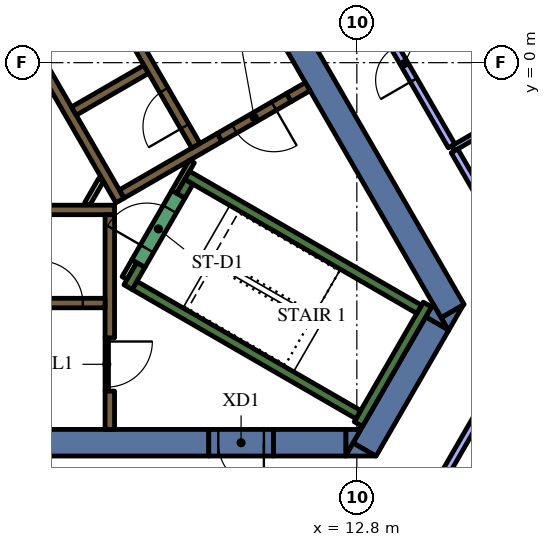
"""IFC4 building model, lengths in metres.
Left out: names, types, materials, properties, quantities, classifications, styles, units other than length and angle.
Written with IfcOpenShell. Run it as: python <this file> out.ifc"""

import sys

from ifc_helpers import new_model, si_unit, direction, frame, frame_2d, origin, place, context, subcontext, project, spatial, polyline, rectangle, outline, extrude, element, fill, save


model = new_model("IFC4")
c1 = context("Model", 3, precision=1e-05, world=origin(), true_north=direction((0.0, 1.0)))
c2 = subcontext(c1, "Body", "Model", "MODEL_VIEW")
j1 = project(units=[si_unit("LENGTHUNIT", "METRE"), si_unit("PLANEANGLEUNIT", "RADIAN")], contexts=[c1])
p1 = place(None, origin())
s1 = spatial("IfcSite", under=j1, at=p1, CompositionType="ELEMENT")
p2 = place(p1, origin())
s2 = spatial("IfcBuilding", under=s1, at=p2, CompositionType="ELEMENT")
p3 = place(p2, frame((0.0, 0.0, 235.2)))
s3 = spatial("IfcBuildingStorey", under=s2, at=p3, CompositionType="ELEMENT", Elevation=235.2)
p4 = place(p3, frame((9.085, 4.264, 0.0), z_axis=(0.0, 0.0, 1.0), x_axis=(0.499998082512, -0.866026510844, 0.0)))
e1 = element("IfcWall", 1, at=p4, inside=s3, PredefinedType="SOLIDWALL", context=c2, shape_type="SweptSolid", body=[
    extrude(rectangle(XDim=12.472, YDim=0.7, at=frame_2d((6.236, 0.0))), origin(), (0.0, 0.0, 1.0), 4.2),
])
p5 = place(p3, origin())
e2 = element("IfcWall", 2, at=p5, inside=s3, PredefinedType="SOLIDWALL", context=c2, shape_type="SweptSolid", body=[
    extrude(outline(polyline([(15.213, -7.05), (15.019, -6.714), (15.601, -6.378), (15.213, -7.05)])), origin(), (0.0, 0.0, 1.0), 4.2),
])
p6 = place(p3, frame((13.003, -10.179, 0.0), z_axis=(0.0, 0.0, 1.0), x_axis=(0.499972675833, 0.866041178825, 0.0)))
e3 = element("IfcWall", 3, at=p6, inside=s3, PredefinedType="SOLIDWALL", context=c2, shape_type="SweptSolid", body=[
    extrude(rectangle(XDim=3.829, YDim=0.7, at=frame_2d((1.915, 0.0))), origin(), (0.0, 0.0, 1.0), 4.2),
])
e4 = element("IfcWall", 4, at=p5, inside=s3, PredefinedType="SOLIDWALL", context=c2, shape_type="SweptSolid", body=[
    extrude(outline(polyline([(12.5, -10.35), (12.698, -10.005), (13.296, -10.35), (12.5, -10.35)])), origin(), (0.0, 0.0, 1.0), 4.2),
])
e5 = element("IfcWall", 5, at=p5, inside=s3, PredefinedType="SOLIDWALL", context=c2, shape_type="SweptSolid", body=[
    extrude(outline(polyline([(14.809, -6.35), (15.197, -7.022), (14.615, -6.686), (14.809, -6.35)])), origin(), (0.0, 0.0, 1.0), 4.2),
])
p7 = place(p3, frame((10.604, -10.0, 0.0), z_axis=(0.0, 0.0, 1.0), x_axis=(1.0, 0.0, 0.0)))
e6 = element("IfcWall", 6, at=p7, inside=s3, PredefinedType="SOLIDWALL", context=c2, shape_type="SweptSolid", body=[
    extrude(rectangle(XDim=1.909, YDim=0.7, at=frame_2d((0.955, 0.0))), origin(), (0.0, 0.0, 1.0), 4.2),
])
e7 = element("IfcWall", 7, at=p5, inside=s3, PredefinedType="SOLIDWALL", context=c2, shape_type="SweptSolid", body=[
    extrude(outline(polyline([(12.904, -9.65), (12.516, -10.322), (12.516, -9.65), (12.904, -9.65)])), origin(), (0.0, 0.0, 1.0), 4.2),
])
p8 = place(p3, frame((8.904, -10.0, 0.0), z_axis=(0.0, 0.0, 1.0), x_axis=(-1.0, 0.0, 0.0)))
e8 = element("IfcWall", 8, at=p8, inside=s3, PredefinedType="SOLIDWALL", context=c2, shape_type="SweptSolid", body=[
    extrude(rectangle(XDim=22.226, YDim=0.7, at=frame_2d((11.113, 0.0))), origin(), (0.0, 0.0, 1.0), 4.2),
])
p9 = place(p3, frame((12.84, -9.511, 0.0), z_axis=(0.0, 0.0, 1.0), x_axis=(0.500048121057, 0.865997619297, 0.0)))
e9 = element("IfcWall", 9, at=p9, inside=s3, PredefinedType="SOLIDWALL", context=c2, shape_type="SweptSolid", body=[
    extrude(rectangle(XDim=3.634, YDim=0.25, at=frame_2d((1.817, 0.0))), origin(), (0.0, 0.0, 1.0), 4.2),
])
p10 = place(p3, frame((12.84, -9.261, 0.0), z_axis=(0.0, 0.0, 1.0), x_axis=(-0.866013990052, 0.500019768644, 0.0)))
e10 = element("IfcWall", 10, at=p10, inside=s3, PredefinedType="SOLIDWALL", context=c2, shape_type="SweptSolid", body=[
    extrude(rectangle(XDim=6.8, YDim=0.25, at=frame_2d((3.4, 0.0))), origin(), (0.0, 0.0, 1.0), 4.2),
])
p11 = place(p3, frame((6.78, -5.906, 0.0), z_axis=(0.0, 0.0, 1.0), x_axis=(0.500223362819, 0.865896406789, 0.0)))
e11 = element("IfcWall", 11, at=p11, inside=s3, PredefinedType="SOLIDWALL", context=c2, shape_type="SweptSolid", body=[
    extrude(rectangle(XDim=0.675, YDim=0.25, at=frame_2d((0.337, 0.0))), origin(), (0.0, 0.0, 1.0), 4.2),
])
p12 = place(p3, frame((8.334, -2.964, 0.0), z_axis=(0.0, 0.0, 1.0), x_axis=(0.866016039709, -0.500016218704, 0.0)))
e12 = element("IfcWall", 12, at=p12, inside=s3, PredefinedType="SOLIDWALL", context=c2, shape_type="SweptSolid", body=[
    extrude(rectangle(XDim=7.05, YDim=0.25, at=frame_2d((3.525, 0.0))), origin(), (0.0, 0.0, 1.0), 4.2),
])
p13 = place(p3, frame((8.168, -3.503, 0.0), z_axis=(0.0, 0.0, 1.0), x_axis=(0.49972245349, 0.866185586049, 0.0)))
e13 = element("IfcWall", 13, at=p13, inside=s3, PredefinedType="SOLIDWALL", context=c2, shape_type="SweptSolid", body=[
    extrude(rectangle(XDim=0.425, YDim=0.25, at=frame_2d((0.212, 0.0))), origin(), (0.0, 0.0, 1.0), 4.2),
])
p14 = place(p3, frame((-5.545, -3.875, 0.0), z_axis=(0.0, 0.0, 1.0), x_axis=(1.0, 0.0, 0.0)))
e14 = element("IfcWall", 14, at=p14, inside=s3, PredefinedType="SOLIDWALL", context=c2, shape_type="SweptSolid", body=[
    extrude(rectangle(XDim=11.97, YDim=0.25, at=frame_2d((5.985, 0.0))), origin(), (0.0, 0.0, 1.0), 4.2),
])
p15 = place(p3, frame((6.3, -7.24, 0.0), z_axis=(0.0, 0.0, 1.0), x_axis=(0.0, 1.0, 0.0)))
e15 = element("IfcWall", 15, at=p15, inside=s3, PredefinedType="SOLIDWALL", context=c2, shape_type="SweptSolid", body=[
    extrude(rectangle(XDim=3.24, YDim=0.25, at=frame_2d((1.62, 0.0))), origin(), (0.0, 0.0, 1.0), 4.2),
])
p16 = place(p3, frame((6.3, -9.65, 0.0), z_axis=(0.0, 0.0, 1.0), x_axis=(0.0, 1.0, 0.0)))
e16 = element("IfcWall", 16, at=p16, inside=s3, PredefinedType="SOLIDWALL", context=c2, shape_type="SweptSolid", body=[
    extrude(rectangle(XDim=1.008, YDim=0.25, at=frame_2d((0.504, 0.0))), origin(), (0.0, 0.0, 1.0), 4.2),
])
p17 = place(p3, frame((11.507, -0.631, 0.0), z_axis=(0.0, 0.0, 1.0), x_axis=(-0.866093731455, -0.499881634324, 0.0)))
e17 = element("IfcWall", 17, at=p17, inside=s3, PredefinedType="SOLIDWALL", context=c2, shape_type="SweptSolid", body=[
    extrude(rectangle(XDim=0.575, YDim=0.25, at=frame_2d((0.288, 0.0))), origin(), (0.0, 0.0, 1.0), 4.2),
])
p18 = place(p3, frame((6.568, -3.627, 0.0), z_axis=(0.0, 0.0, 1.0), x_axis=(-0.499999455981, 0.866025717874, 0.0)))
e18 = element("IfcWall", 18, at=p18, inside=s3, PredefinedType="SOLIDWALL", context=c2, shape_type="SweptSolid", body=[
    extrude(rectangle(XDim=11.978, YDim=0.25, at=frame_2d((5.989, 0.0))), origin(), (0.0, 0.0, 1.0), 4.2),
])
p19 = place(p3, frame((5.354, -1.274, 0.0), z_axis=(0.0, 0.0, 1.0), x_axis=(0.866008176907, 0.50002983664, 0.0)))
e19 = element("IfcWall", 19, at=p19, inside=s3, PredefinedType="SOLIDWALL", context=c2, shape_type="SweptSolid", body=[
    extrude(rectangle(XDim=2.2, YDim=0.25, at=frame_2d((1.1, 0.0))), origin(), (0.0, 0.0, 1.0), 4.2),
])
p20 = place(p3, frame((6.614, -3.456, 0.0), z_axis=(0.0, 0.0, 1.0), x_axis=(0.866032512851, 0.499987686533, 0.0)))
e20 = element("IfcWall", 20, at=p20, inside=s3, PredefinedType="SOLIDWALL", context=c2, shape_type="SweptSolid", body=[
    extrude(rectangle(XDim=2.975, YDim=0.25, at=frame_2d((1.487, 0.0))), origin(), (0.0, 0.0, 1.0), 4.2),
])
p21 = place(p3, frame((6.945, -5.222, 0.0), z_axis=(0.0, 0.0, 1.0), x_axis=(-0.499818422106, -0.866130212453, 0.0)))
e21 = element("IfcWall", 21, at=p21, inside=s3, PredefinedType="PARTITIONING", context=c2, shape_type="SweptSolid", body=[
    extrude(rectangle(XDim=0.514, YDim=0.15, at=frame_2d((0.257, 0.0))), origin(), (0.0, 0.0, 1.0), 3.45),
])
p22 = place(p3, frame((8.459, -2.599, 0.0), z_axis=(0.0, 0.0, 1.0), x_axis=(-0.500041054325, -0.866001699761, 0.0)))
e22 = element("IfcWall", 22, at=p22, inside=s3, PredefinedType="PARTITIONING", context=c2, shape_type="SweptSolid", body=[
    extrude(rectangle(XDim=0.929, YDim=0.15, at=frame_2d((0.464, 0.0))), origin(), (0.0, 0.0, 1.0), 4.2),
])
p23 = place(p3, frame((5.705, -3.718, 0.0), z_axis=(0.0, 0.0, 1.0), x_axis=(0.499962090823, 0.866047289552, 0.0)))
e23 = element("IfcWall", 23, at=p23, inside=s3, PredefinedType="PARTITIONING", context=c2, shape_type="SweptSolid", body=[
    extrude(rectangle(XDim=0.735, YDim=0.15, at=frame_2d((0.367, 0.0))), origin(), (0.0, 0.0, 1.0), 3.45),
])
p24 = place(p3, frame((-6.175, -6.325, 0.0), z_axis=(0.0, 0.0, 1.0), x_axis=(1.0, 0.0, 0.0)))
e24 = element("IfcWall", 24, at=p24, inside=s3, PredefinedType="SOLIDWALL", context=c2, shape_type="SweptSolid", body=[
    extrude(rectangle(XDim=12.35, YDim=0.25, at=frame_2d((6.175, 0.0))), origin(), (0.0, 0.0, 1.0), 4.2),
])
p25 = place(p24, frame((0.585, 0.0, 0.0)))
e25 = element("IfcOpeningElement", 25, at=p25, cuts=e24, PredefinedType="OPENING", context=c2, shape_type="SweptSolid", body=[
    extrude(rectangle(XDim=1.1, YDim=2.1, at=frame_2d((0.55, 1.05))), frame((0.0, 0.135, 0.0), z_axis=(0.0, -1.0, 0.0), x_axis=(1.0, 0.0, 0.0)), (0.0, 0.0, 1.0), 0.27),
])
p26 = place(p24, frame((3.105, 0.0, 0.0)))
e26 = element("IfcOpeningElement", 26, at=p26, cuts=e24, PredefinedType="OPENING", context=c2, shape_type="SweptSolid", body=[
    extrude(rectangle(XDim=1.1, YDim=2.1, at=frame_2d((0.55, 1.05))), frame((0.0, 0.135, 0.0), z_axis=(0.0, -1.0, 0.0), x_axis=(1.0, 0.0, 0.0)), (0.0, 0.0, 1.0), 0.27),
])
p27 = place(p24, frame((5.625, 0.0, 0.0)))
e27 = element("IfcOpeningElement", 27, at=p27, cuts=e24, PredefinedType="OPENING", context=c2, shape_type="SweptSolid", body=[
    extrude(rectangle(XDim=1.1, YDim=2.1, at=frame_2d((0.55, 1.05))), frame((0.0, 0.135, 0.0), z_axis=(0.0, -1.0, 0.0), x_axis=(1.0, 0.0, 0.0)), (0.0, 0.0, 1.0), 0.27),
])
p28 = place(p24, frame((8.145, 0.0, 0.0)))
e28 = element("IfcOpeningElement", 28, at=p28, cuts=e24, PredefinedType="OPENING", context=c2, shape_type="SweptSolid", body=[
    extrude(rectangle(XDim=1.1, YDim=2.1, at=frame_2d((0.55, 1.05))), frame((0.0, 0.135, 0.0), z_axis=(0.0, -1.0, 0.0), x_axis=(1.0, 0.0, 0.0)), (0.0, 0.0, 1.0), 0.27),
])
p29 = place(p24, frame((10.665, 0.0, 0.0)))
e29 = element("IfcOpeningElement", 29, at=p29, cuts=e24, PredefinedType="OPENING", context=c2, shape_type="SweptSolid", body=[
    extrude(rectangle(XDim=1.1, YDim=2.1, at=frame_2d((0.55, 1.05))), frame((0.0, 0.135, 0.0), z_axis=(0.0, -1.0, 0.0), x_axis=(1.0, 0.0, 0.0)), (0.0, 0.0, 1.0), 0.27),
])
p30 = place(p3, frame((8.565, -2.185, 0.0), z_axis=(0.0, 0.0, 1.0), x_axis=(-0.499997954832, 0.866026584559, 0.0)))
e30 = element("IfcWall", 30, at=p30, inside=s3, PredefinedType="SOLIDWALL", context=c2, shape_type="SweptSolid", body=[
    extrude(rectangle(XDim=12.35, YDim=0.25, at=frame_2d((6.175, 0.0))), origin(), (0.0, 0.0, 1.0), 4.2),
])
p31 = place(p30, frame((0.585, 0.0, 0.0)))
e31 = element("IfcOpeningElement", 31, at=p31, cuts=e30, PredefinedType="OPENING", context=c2, shape_type="SweptSolid", body=[
    extrude(rectangle(XDim=1.1, YDim=2.1, at=frame_2d((0.55, 1.05))), frame((0.0, 0.135, 0.0), z_axis=(0.0, -1.0, 0.0), x_axis=(1.0, 0.0, 0.0)), (0.0, 0.0, 1.0), 0.27),
])
p32 = place(p3, frame((7.053, -5.284, 0.0), z_axis=(0.0, 0.0, 1.0), x_axis=(0.500078061341, 0.865980330357, 0.0)))
e32 = element("IfcWall", 32, at=p32, inside=s3, PredefinedType="SOLIDWALL", context=c2, shape_type="SweptSolid", body=[
    extrude(rectangle(XDim=2.1, YDim=0.4, at=frame_2d((1.05, 0.0))), origin(), (0.0, 0.0, 1.0), 4.2),
])
p33 = place(p32, frame((0.45, 0.0, 0.0)))
e33 = element("IfcOpeningElement", 33, at=p33, cuts=e32, PredefinedType="OPENING", context=c2, shape_type="SweptSolid", body=[
    extrude(rectangle(XDim=1.2, YDim=2.1, at=frame_2d((0.6, 1.05))), frame((0.0, 0.21, 0.0), z_axis=(0.0, -1.0, 0.0), x_axis=(1.0, 0.0, 0.0)), (0.0, 0.0, 1.0), 0.42),
])
p34 = place(p3, frame((6.22, -7.237, 0.0), z_axis=(0.0, 0.0, 1.0), x_axis=(0.0, -1.0, 0.0)))
e34 = element("IfcWall", 34, at=p34, inside=s3, PredefinedType="PARTITIONING", context=c2, shape_type="SweptSolid", body=[
    extrude(rectangle(XDim=1.4, YDim=0.09, at=frame_2d((0.7, 0.0))), origin(), (0.0, 0.0, 1.0), 3.45),
])
p35 = place(p34, frame((0.1, 0.0, 0.0)))
e35 = element("IfcOpeningElement", 35, at=p35, cuts=e34, PredefinedType="OPENING", context=c2, shape_type="SweptSolid", body=[
    extrude(rectangle(XDim=1.2, YDim=2.1, at=frame_2d((0.6, 1.05))), frame((0.0, 0.055, 0.0), z_axis=(0.0, -1.0, 0.0), x_axis=(1.0, 0.0, 0.0)), (0.0, 0.0, 1.0), 0.11),
])
p36 = place(p3, frame((11.009, -0.919, 0.0), z_axis=(0.0, 0.0, 1.0), x_axis=(-0.866059744384, -0.49994051562, 0.0)))
e36 = element("IfcWall", 36, at=p36, inside=s3, PredefinedType="SOLIDWALL", context=c2, shape_type="SweptSolid", body=[
    extrude(rectangle(XDim=2.1, YDim=0.25, at=frame_2d((1.05, 0.0))), origin(), (0.0, 0.0, 1.0), 4.2),
])
p37 = place(p36, frame((0.45, 0.0, 0.0)))
e37 = element("IfcOpeningElement", 37, at=p37, cuts=e36, PredefinedType="OPENING", context=c2, shape_type="SweptSolid", body=[
    extrude(rectangle(XDim=1.2, YDim=2.1, at=frame_2d((0.6, 1.05))), frame((0.0, 0.135, 0.0), z_axis=(0.0, -1.0, 0.0), x_axis=(1.0, 0.0, 0.0)), (0.0, 0.0, 1.0), 0.27),
])
p38 = place(p3, frame((10.604, -10.0, 0.0), z_axis=(0.0, 0.0, 1.0), x_axis=(-1.0, 0.0, 0.0)))
e38 = element("IfcWall", 38, at=p38, inside=s3, PredefinedType="SOLIDWALL", context=c2, shape_type="SweptSolid", body=[
    extrude(rectangle(XDim=1.7, YDim=0.7, at=frame_2d((0.85, 0.0))), origin(), (0.0, 0.0, 1.0), 4.2),
])
p39 = place(p38, frame((0.25, 0.0, 0.0)))
e39 = element("IfcOpeningElement", 39, at=p39, cuts=e38, PredefinedType="OPENING", context=c2, shape_type="SweptSolid", body=[
    extrude(rectangle(XDim=1.2, YDim=2.1, at=frame_2d((0.6, 1.05))), frame((0.0, 0.36, 0.0), z_axis=(0.0, -1.0, 0.0), x_axis=(1.0, 0.0, 0.0)), (0.0, 0.0, 1.0), 0.72),
])
p40 = place(p3, frame((14.362, -12.124, 0.0), z_axis=(0.0, 0.0, 1.0), x_axis=(0.500017005442, 0.866015585465, 0.0)))
e40 = element("IfcWall", 40, at=p40, inside=s3, PredefinedType="PARTITIONING", context=c2, shape_type="SweptSolid", body=[
    extrude(rectangle(XDim=6.338, YDim=0.2, at=frame_2d((3.169, 0.0))), origin(), (0.0, 0.0, 1.0), 3.45),
])
p41 = place(p3, frame((18.367, -0.504, 0.0), z_axis=(0.0, 0.0, 1.0), x_axis=(-0.866056812483, -0.499945594592, 0.0)))
e41 = element("IfcWall", 41, at=p41, inside=s3, PredefinedType="PARTITIONING", context=c2, shape_type="SweptSolid", body=[
    extrude(rectangle(XDim=3.504, YDim=0.15, at=frame_2d((1.752, 0.0))), origin(), (0.0, 0.0, 1.0), 3.45),
])
p42 = place(p41, frame((1.304, 0.0, 0.0)))
e42 = element("IfcOpeningElement", 42, at=p42, cuts=e41, PredefinedType="OPENING", context=c2, shape_type="SweptSolid", body=[
    extrude(rectangle(XDim=0.9, YDim=2.1, at=frame_2d((0.45, 1.05))), frame((0.0, 0.085, 0.0), z_axis=(0.0, -1.0, 0.0), x_axis=(1.0, 0.0, 0.0)), (0.0, 0.0, 1.0), 0.17),
])
p43 = place(p3, frame((17.696, -6.35, 0.0), z_axis=(0.0, 0.0, 1.0), x_axis=(-0.499976825411, 0.866038783226, 0.0)))
e43 = element("IfcWall", 43, at=p43, inside=s3, PredefinedType="PARTITIONING", context=c2, shape_type="SweptSolid", body=[
    extrude(rectangle(XDim=4.653, YDim=0.2, at=frame_2d((2.326, 0.0))), origin(), (0.0, 0.0, 1.0), 3.45),
])
p44 = place(p3, frame((15.295, -2.191, 0.0), z_axis=(0.0, 0.0, 1.0), x_axis=(-0.500039923732, 0.86600235258, 0.0)))
e44 = element("IfcWall", 44, at=p44, inside=s3, PredefinedType="PARTITIONING", context=c2, shape_type="SweptSolid", body=[
    extrude(rectangle(XDim=5.015, YDim=0.2, at=frame_2d((2.507, 0.0))), origin(), (0.0, 0.0, 1.0), 3.45),
])
p45 = place(p44, frame((2.0, 0.0, 0.0)))
e45 = element("IfcOpeningElement", 45, at=p45, cuts=e44, PredefinedType="OPENING", context=c2, shape_type="SweptSolid", body=[
    extrude(rectangle(XDim=1.0, YDim=2.1, at=frame_2d((0.5, 1.05))), frame((0.0, 0.11, 0.0), z_axis=(0.0, -1.0, 0.0), x_axis=(1.0, 0.0, 0.0)), (0.0, 0.0, 1.0), 0.22),
])
p46 = place(p29, origin())
e46 = element("IfcDoor", 46, at=p46, inside=s3, OperationType="DOUBLE_DOOR_SLIDING", PredefinedType="DOOR", context=c2, shape_type="SweptSolid", body=[
    extrude(rectangle(XDim=1.1, YDim=2.1, at=frame_2d((0.55, 1.05))), frame((0.0, 0.025, 0.0), z_axis=(0.0, -1.0, 0.0), x_axis=(1.0, 0.0, 0.0)), (0.0, 0.0, 1.0), 0.05),
])
fill(e29, e46)
p47 = place(p31, origin())
e47 = element("IfcDoor", 47, at=p47, inside=s3, OperationType="DOUBLE_DOOR_SLIDING", PredefinedType="DOOR", context=c2, shape_type="SweptSolid", body=[
    extrude(rectangle(XDim=1.1, YDim=2.1, at=frame_2d((0.55, 1.05))), frame((0.0, 0.025, 0.0), z_axis=(0.0, -1.0, 0.0), x_axis=(1.0, 0.0, 0.0)), (0.0, 0.0, 1.0), 0.05),
])
fill(e31, e47)
p48 = place(p33, origin())
e48 = element("IfcDoor", 48, at=p48, inside=s3, OperationType="SINGLE_SWING_LEFT", PredefinedType="DOOR", context=c2, shape_type="SweptSolid", body=[
    extrude(rectangle(XDim=1.2, YDim=2.1, at=frame_2d((0.6, 1.05))), frame((0.0, 0.025, 0.0), z_axis=(0.0, -1.0, 0.0), x_axis=(1.0, 0.0, 0.0)), (0.0, 0.0, 1.0), 0.05),
])
fill(e33, e48)
p49 = place(p35, origin())
e49 = element("IfcDoor", 49, at=p49, inside=s3, OperationType="SINGLE_SWING_LEFT", PredefinedType="DOOR", context=c2, shape_type="SweptSolid", body=[
    extrude(rectangle(XDim=1.2, YDim=2.1, at=frame_2d((0.6, 1.05))), frame((0.0, 0.025, 0.0), z_axis=(0.0, -1.0, 0.0), x_axis=(1.0, 0.0, 0.0)), (0.0, 0.0, 1.0), 0.05),
])
fill(e35, e49)
p50 = place(p37, origin())
e50 = element("IfcDoor", 50, at=p50, inside=s3, OperationType="SINGLE_SWING_LEFT", PredefinedType="DOOR", context=c2, shape_type="SweptSolid", body=[
    extrude(rectangle(XDim=1.2, YDim=2.1, at=frame_2d((0.6, 1.05))), frame((0.0, 0.025, 0.0), z_axis=(0.0, -1.0, 0.0), x_axis=(1.0, 0.0, 0.0)), (0.0, 0.0, 1.0), 0.05),
])
fill(e37, e50)
p51 = place(p39, origin())
e51 = element("IfcDoor", 51, at=p51, inside=s3, OperationType="SINGLE_SWING_LEFT", PredefinedType="DOOR", context=c2, shape_type="SweptSolid", body=[
    extrude(rectangle(XDim=1.2, YDim=2.1, at=frame_2d((0.6, 1.05))), frame((0.0, 0.025, 0.0), z_axis=(0.0, -1.0, 0.0), x_axis=(1.0, 0.0, 0.0)), (0.0, 0.0, 1.0), 0.05),
])
fill(e39, e51)
p52 = place(p45, origin())
e52 = element("IfcDoor", 52, at=p52, inside=s3, OperationType="SINGLE_SWING_LEFT", PredefinedType="DOOR", context=c2, shape_type="SweptSolid", body=[
    extrude(rectangle(XDim=1.0, YDim=2.1, at=frame_2d((0.5, 1.05))), frame((0.0, 0.025, 0.0), z_axis=(0.0, -1.0, 0.0), x_axis=(1.0, 0.0, 0.0)), (0.0, 0.0, 1.0), 0.05),
])
fill(e45, e52)
save(model, sys.argv[1])
